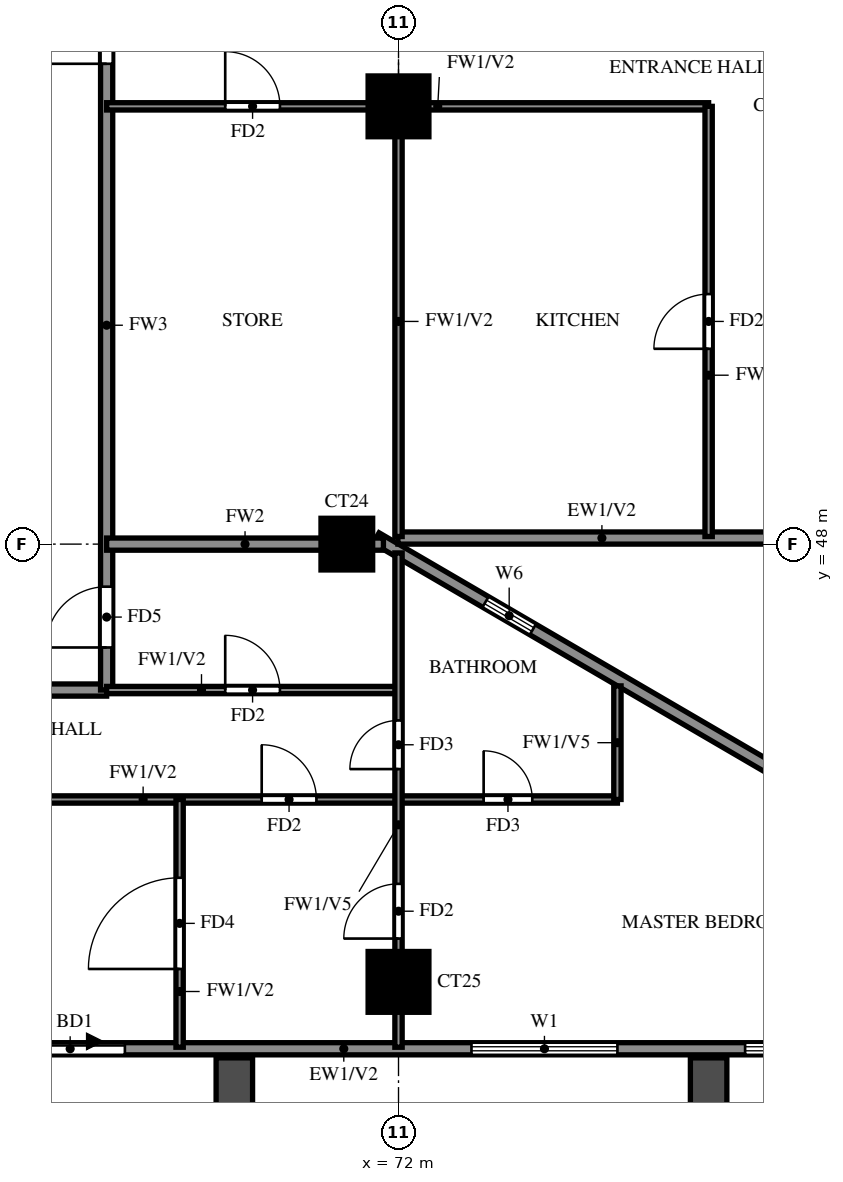
"""IFC4 building model, lengths in metres.
Left out: names, types, materials, properties, quantities, classifications, styles, units other than length and angle.
Written with IfcOpenShell. Run it as: python <this file> out.ifc"""

import sys

from ifc_helpers import new_model, si_unit, direction, frame, frame_2d, origin, origin_2d, place, context, subcontext, project, spatial, rectangle, extrude, source, transform, mapped, element, fill, save


model = new_model("IFC4")
c1 = context("Model", 3, precision=1e-05, world=origin(), true_north=direction((0.0, 1.0)))
c2 = subcontext(c1, "Body", "Model", "MODEL_VIEW")
j1 = project(units=[si_unit("LENGTHUNIT", "METRE"), si_unit("PLANEANGLEUNIT", "RADIAN")], contexts=[c1])
p1 = place(None, origin())
s1 = spatial("IfcSite", under=j1, at=p1, CompositionType="ELEMENT")
p2 = place(p1, origin())
s2 = spatial("IfcBuilding", under=s1, at=p2, CompositionType="ELEMENT")
p3 = place(p2, frame((0.0, 0.0, 157.0)))
s3 = spatial("IfcBuildingStorey", under=s2, at=p3, CompositionType="ELEMENT", Elevation=157.0)
m1 = source(origin(), c2, "Body", "SweptSolid", [
    extrude(rectangle(XDim=1.0, YDim=1.0, at=origin_2d()), origin(), (0.0, 0.0, 1.0), 3.2),
])
p4 = place(p3, frame((72.0, 40.8, 0.0), z_axis=(0.0, 0.0, 1.0), x_axis=(1.0, 0.0, 0.0)))
e1 = element("IfcColumn", 1, at=p4, inside=s3, PredefinedType="COLUMN", context=c2, shape_type="MappedRepresentation", body=[
    mapped(m1, transform((0.0, 0.0, 0.0))),
])
m2 = source(origin(), c2, "Body", "SweptSolid", [
    extrude(rectangle(XDim=0.85, YDim=0.85, at=origin_2d()), origin(), (0.0, 0.0, 1.0), 3.2),
])
p5 = place(p3, frame((71.15, 48.0, 0.0), z_axis=(0.0, 0.0, 1.0), x_axis=(1.0, 0.0, 0.0)))
e2 = element("IfcColumn", 2, at=p5, inside=s3, PredefinedType="COLUMN", context=c2, shape_type="MappedRepresentation", body=[
    mapped(m2, transform((0.0, 0.0, 0.0))),
])
p6 = place(p3, frame((72.0, 55.2, 0.0), z_axis=(0.0, 0.0, 1.0), x_axis=(1.0, 0.0, 0.0)))
e3 = element("IfcColumn", 3, at=p6, inside=s3, PredefinedType="COLUMN", context=c2, shape_type="MappedRepresentation", body=[
    mapped(m1, transform((0.0, 0.0, 0.0))),
])
p7 = place(p3, frame((85.719, 39.881, 0.0), z_axis=(0.0, 0.0, 1.0), x_axis=(-0.86377618652, 0.503875678716, 0.0)))
e4 = element("IfcWall", 4, at=p7, inside=s3, PredefinedType="SOLIDWALL", context=c2, shape_type="SweptSolid", body=[
    extrude(rectangle(XDim=16.311, YDim=0.2, at=frame_2d((8.156, 0.0))), origin(), (0.0, 0.0, 1.0), 3.2),
])
p8 = place(p7, frame((13.326, 0.0, 1.5)))
e5 = element("IfcOpeningElement", 5, at=p8, cuts=e4, PredefinedType="OPENING", context=c2, shape_type="SweptSolid", body=[
    extrude(rectangle(XDim=0.9, YDim=0.9, at=frame_2d((0.45, 0.45))), frame((0.0, 0.11, 0.0), z_axis=(0.0, -1.0, 0.0), x_axis=(1.0, 0.0, 0.0)), (0.0, 0.0, 1.0), 0.22),
])
p9 = place(p3, frame((71.99, 48.1, 0.0), z_axis=(0.0, 0.0, 1.0), x_axis=(1.0, 0.0, 0.0)))
e6 = element("IfcWall", 6, at=p9, inside=s3, PredefinedType="SOLIDWALL", context=c2, shape_type="SweptSolid", body=[
    extrude(rectangle(XDim=6.71, YDim=0.2, at=frame_2d((3.355, 0.0))), origin(), (0.0, 0.0, 1.0), 3.2),
])
p10 = place(p3, frame((58.8, 39.7, 0.0), z_axis=(0.0, 0.0, 1.0), x_axis=(1.0, 0.0, 0.0)))
e7 = element("IfcWall", 7, at=p10, inside=s3, PredefinedType="SOLIDWALL", context=c2, shape_type="SweptSolid", body=[
    extrude(rectangle(XDim=24.6, YDim=0.2, at=frame_2d((12.3, 0.0))), origin(), (0.0, 0.0, 1.0), 3.2),
])
p11 = place(p10, frame((6.9, 0.0, 0.0)))
e8 = element("IfcOpeningElement", 8, at=p11, cuts=e7, PredefinedType="OPENING", context=c2, shape_type="SweptSolid", body=[
    extrude(rectangle(XDim=1.8, YDim=2.4, at=frame_2d((0.9, 1.2))), frame((0.0, 0.11, 0.0), z_axis=(0.0, -1.0, 0.0), x_axis=(1.0, 0.0, 0.0)), (0.0, 0.0, 1.0), 0.22),
])
p12 = place(p10, frame((20.7, 0.0, 0.0)))
e9 = element("IfcOpeningElement", 9, at=p12, cuts=e7, PredefinedType="OPENING", context=c2, shape_type="SweptSolid", body=[
    extrude(rectangle(XDim=1.8, YDim=2.4, at=frame_2d((0.9, 1.2))), frame((0.0, 0.11, 0.0), z_axis=(0.0, -1.0, 0.0), x_axis=(1.0, 0.0, 0.0)), (0.0, 0.0, 1.0), 0.22),
])
p13 = place(p10, frame((1.5, 0.0, 0.6)))
e10 = element("IfcOpeningElement", 10, at=p13, cuts=e7, PredefinedType="OPENING", context=c2, shape_type="SweptSolid", body=[
    extrude(rectangle(XDim=1.8, YDim=2.4, at=frame_2d((0.9, 1.2))), frame((0.0, 0.11, 0.0), z_axis=(0.0, -1.0, 0.0), x_axis=(1.0, 0.0, 0.0)), (0.0, 0.0, 1.0), 0.22),
])
p14 = place(p10, frame((4.5, 0.0, 0.6)))
e11 = element("IfcOpeningElement", 11, at=p14, cuts=e7, PredefinedType="OPENING", context=c2, shape_type="SweptSolid", body=[
    extrude(rectangle(XDim=1.8, YDim=2.4, at=frame_2d((0.9, 1.2))), frame((0.0, 0.11, 0.0), z_axis=(0.0, -1.0, 0.0), x_axis=(1.0, 0.0, 0.0)), (0.0, 0.0, 1.0), 0.22),
])
p15 = place(p10, frame((14.4, 0.0, 0.6)))
e12 = element("IfcOpeningElement", 12, at=p15, cuts=e7, PredefinedType="OPENING", context=c2, shape_type="SweptSolid", body=[
    extrude(rectangle(XDim=2.4, YDim=2.4, at=frame_2d((1.2, 1.2))), frame((0.0, 0.11, 0.0), z_axis=(0.0, -1.0, 0.0), x_axis=(1.0, 0.0, 0.0)), (0.0, 0.0, 1.0), 0.22),
])
p16 = place(p10, frame((18.9, 0.0, 0.6)))
e13 = element("IfcOpeningElement", 13, at=p16, cuts=e7, PredefinedType="OPENING", context=c2, shape_type="SweptSolid", body=[
    extrude(rectangle(XDim=1.2, YDim=2.4, at=frame_2d((0.6, 1.2))), frame((0.0, 0.11, 0.0), z_axis=(0.0, -1.0, 0.0), x_axis=(1.0, 0.0, 0.0)), (0.0, 0.0, 1.0), 0.22),
])
p17 = place(p10, frame((23.0, 0.0, 0.6)))
e14 = element("IfcOpeningElement", 14, at=p17, cuts=e7, PredefinedType="OPENING", context=c2, shape_type="SweptSolid", body=[
    extrude(rectangle(XDim=1.2, YDim=2.4, at=frame_2d((0.6, 1.2))), frame((0.0, 0.11, 0.0), z_axis=(0.0, -1.0, 0.0), x_axis=(1.0, 0.0, 0.0)), (0.0, 0.0, 1.0), 0.22),
])
for number, where, z_axis, x_axis in (
    (15, (69.3, 39.55, 0.0), (0.0, 0.0, 1.0), (0.0, -1.0, 0.0)),
    (16, (77.1, 39.55, 0.0), (0.0, 0.0, 1.0), (0.0, -1.0, 0.0)),
):
    element("IfcWall", number, at=place(p3, frame(where, z_axis=z_axis, x_axis=x_axis)), inside=s3, PredefinedType="SOLIDWALL", context=c2, shape_type="SweptSolid", body=[
        extrude(rectangle(XDim=2.65, YDim=0.6, at=frame_2d((1.325, 0.0))), origin(), (0.0, 0.0, 1.0), 2.85),
    ])
p18 = place(p3, frame((60.0, 45.6, 0.0), z_axis=(0.0, 0.0, 1.0), x_axis=(1.0, 0.0, 0.0)))
e17 = element("IfcWall", 17, at=p18, inside=s3, PredefinedType="SOLIDWALL", context=c2, shape_type="SweptSolid", body=[
    extrude(rectangle(XDim=7.2, YDim=0.2, at=frame_2d((3.6, 0.0))), origin(), (0.0, 0.0, 1.0), 3.2),
])
p19 = place(p3, frame((67.2, 45.6, 0.0), z_axis=(0.0, 0.0, 1.0), x_axis=(0.0, 1.0, 0.0)))
e18 = element("IfcWall", 18, at=p19, inside=s3, PredefinedType="SOLIDWALL", context=c2, shape_type="SweptSolid", body=[
    extrude(rectangle(XDim=12.0, YDim=0.2, at=frame_2d((6.0, 0.0))), origin(), (0.0, 0.0, 1.0), 3.2),
])
p20 = place(p19, frame((10.3, 0.0, 0.0)))
e19 = element("IfcOpeningElement", 19, at=p20, cuts=e18, PredefinedType="OPENING", context=c2, shape_type="SweptSolid", body=[
    extrude(rectangle(XDim=1.0, YDim=2.1, at=frame_2d((0.5, 1.05))), frame((0.0, 0.11, 0.0), z_axis=(0.0, -1.0, 0.0), x_axis=(1.0, 0.0, 0.0)), (0.0, 0.0, 1.0), 0.22),
])
p21 = place(p19, frame((0.7, 0.0, 0.0)))
e20 = element("IfcOpeningElement", 20, at=p21, cuts=e18, PredefinedType="OPENING", context=c2, shape_type="SweptSolid", body=[
    extrude(rectangle(XDim=1.0, YDim=2.1, at=frame_2d((0.5, 1.05))), frame((0.0, 0.11, 0.0), z_axis=(0.0, -1.0, 0.0), x_axis=(1.0, 0.0, 0.0)), (0.0, 0.0, 1.0), 0.22),
])
p22 = place(p3, frame((67.2, 48.0, 0.0), z_axis=(0.0, 0.0, 1.0), x_axis=(1.0, 0.0, 0.0)))
e21 = element("IfcWall", 21, at=p22, inside=s3, PredefinedType="SOLIDWALL", context=c2, shape_type="SweptSolid", body=[
    extrude(rectangle(XDim=4.552, YDim=0.2, at=frame_2d((2.276, 0.0))), origin(), (0.0, 0.0, 1.0), 3.2),
])
p23 = place(p3, frame((60.0, 43.8, 0.0), z_axis=(0.0, 0.0, 1.0), x_axis=(1.0, 0.0, 0.0)))
e22 = element("IfcWall", 22, at=p23, inside=s3, PredefinedType="PARTITIONING", context=c2, shape_type="SweptSolid", body=[
    extrude(rectangle(XDim=15.6, YDim=0.12, at=frame_2d((7.8, 0.0))), origin(), (0.0, 0.0, 1.0), 3.2),
])
p24 = place(p23, frame((9.75, 0.0, 0.0)))
e23 = element("IfcOpeningElement", 23, at=p24, cuts=e22, PredefinedType="OPENING", context=c2, shape_type="SweptSolid", body=[
    extrude(rectangle(XDim=0.9, YDim=2.1, at=frame_2d((0.45, 1.05))), frame((0.0, 0.07, 0.0), z_axis=(0.0, -1.0, 0.0), x_axis=(1.0, 0.0, 0.0)), (0.0, 0.0, 1.0), 0.14),
])
p25 = place(p23, frame((3.45, 0.0, 0.0)))
e24 = element("IfcOpeningElement", 24, at=p25, cuts=e22, PredefinedType="OPENING", context=c2, shape_type="SweptSolid", body=[
    extrude(rectangle(XDim=1.5, YDim=2.1, at=frame_2d((0.75, 1.05))), frame((0.0, 0.07, 0.0), z_axis=(0.0, -1.0, 0.0), x_axis=(1.0, 0.0, 0.0)), (0.0, 0.0, 1.0), 0.14),
])
p26 = place(p23, frame((13.4, 0.0, 0.0)))
e25 = element("IfcOpeningElement", 25, at=p26, cuts=e22, PredefinedType="OPENING", context=c2, shape_type="SweptSolid", body=[
    extrude(rectangle(XDim=0.8, YDim=2.1, at=frame_2d((0.4, 1.05))), frame((0.0, 0.07, 0.0), z_axis=(0.0, -1.0, 0.0), x_axis=(1.0, 0.0, 0.0)), (0.0, 0.0, 1.0), 0.14),
])
p27 = place(p3, frame((67.2, 45.6, 0.0), z_axis=(0.0, 0.0, 1.0), x_axis=(1.0, 0.0, 0.0)))
e26 = element("IfcWall", 26, at=p27, inside=s3, PredefinedType="PARTITIONING", context=c2, shape_type="SweptSolid", body=[
    extrude(rectangle(XDim=4.8, YDim=0.12, at=frame_2d((2.4, 0.0))), origin(), (0.0, 0.0, 1.0), 3.2),
])
p28 = place(p27, frame((1.95, 0.0, 0.0)))
e27 = element("IfcOpeningElement", 27, at=p28, cuts=e26, PredefinedType="OPENING", context=c2, shape_type="SweptSolid", body=[
    extrude(rectangle(XDim=0.9, YDim=2.1, at=frame_2d((0.45, 1.05))), frame((0.0, 0.07, 0.0), z_axis=(0.0, -1.0, 0.0), x_axis=(1.0, 0.0, 0.0)), (0.0, 0.0, 1.0), 0.14),
])
p29 = place(p3, frame((67.2, 55.2, 0.0), z_axis=(0.0, 0.0, 1.0), x_axis=(1.0, 0.0, 0.0)))
e28 = element("IfcWall", 28, at=p29, inside=s3, PredefinedType="PARTITIONING", context=c2, shape_type="SweptSolid", body=[
    extrude(rectangle(XDim=9.9, YDim=0.12, at=frame_2d((4.95, 0.0))), origin(), (0.0, 0.0, 1.0), 3.2),
])
p30 = place(p29, frame((1.95, 0.0, 0.0)))
e29 = element("IfcOpeningElement", 29, at=p30, cuts=e28, PredefinedType="OPENING", context=c2, shape_type="SweptSolid", body=[
    extrude(rectangle(XDim=0.9, YDim=2.1, at=frame_2d((0.45, 1.05))), frame((0.0, 0.07, 0.0), z_axis=(0.0, -1.0, 0.0), x_axis=(1.0, 0.0, 0.0)), (0.0, 0.0, 1.0), 0.14),
])
p31 = place(p3, frame((68.4, 39.725, 0.0), z_axis=(0.0, 0.0, 1.0), x_axis=(0.0, 1.0, 0.0)))
e30 = element("IfcWall", 30, at=p31, inside=s3, PredefinedType="PARTITIONING", context=c2, shape_type="SweptSolid", body=[
    extrude(rectangle(XDim=4.075, YDim=0.12, at=frame_2d((2.038, 0.0))), origin(), (0.0, 0.0, 1.0), 3.2),
])
p32 = place(p31, frame((1.288, 0.0, 0.0)))
e31 = element("IfcOpeningElement", 31, at=p32, cuts=e30, PredefinedType="OPENING", context=c2, shape_type="SweptSolid", body=[
    extrude(rectangle(XDim=1.5, YDim=2.1, at=frame_2d((0.75, 1.05))), frame((0.0, 0.07, 0.0), z_axis=(0.0, -1.0, 0.0), x_axis=(1.0, 0.0, 0.0)), (0.0, 0.0, 1.0), 0.14),
])
p33 = place(p3, frame((72.0, 39.725, 0.0), z_axis=(0.0, 0.0, 1.0), x_axis=(0.0, 1.0, 0.0)))
e32 = element("IfcWall", 32, at=p33, inside=s3, PredefinedType="PARTITIONING", context=c2, shape_type="SweptSolid", body=[
    extrude(rectangle(XDim=8.13, YDim=0.12, at=frame_2d((4.065, 0.0))), origin(), (0.0, 0.0, 1.0), 2.3),
])
p34 = place(p33, frame((1.788, 0.0, 0.0)))
e33 = element("IfcOpeningElement", 33, at=p34, cuts=e32, PredefinedType="OPENING", context=c2, shape_type="SweptSolid", body=[
    extrude(rectangle(XDim=0.9, YDim=2.1, at=frame_2d((0.45, 1.05))), frame((0.0, 0.07, 0.0), z_axis=(0.0, -1.0, 0.0), x_axis=(1.0, 0.0, 0.0)), (0.0, 0.0, 1.0), 0.14),
])
p35 = place(p33, frame((4.575, 0.0, 0.0)))
e34 = element("IfcOpeningElement", 34, at=p35, cuts=e32, PredefinedType="OPENING", context=c2, shape_type="SweptSolid", body=[
    extrude(rectangle(XDim=0.8, YDim=2.1, at=frame_2d((0.4, 1.05))), frame((0.0, 0.07, 0.0), z_axis=(0.0, -1.0, 0.0), x_axis=(1.0, 0.0, 0.0)), (0.0, 0.0, 1.0), 0.14),
])
p36 = place(p3, frame((72.0, 48.125, 0.0), z_axis=(0.0, 0.0, 1.0), x_axis=(0.0, 1.0, 0.0)))
e35 = element("IfcWall", 35, at=p36, inside=s3, PredefinedType="PARTITIONING", context=c2, shape_type="SweptSolid", body=[
    extrude(rectangle(XDim=7.075, YDim=0.12, at=frame_2d((3.538, 0.0))), origin(), (0.0, 0.0, 1.0), 3.2),
])
p37 = place(p3, frame((75.6, 43.8, 0.0), z_axis=(0.0, 0.0, 1.0), x_axis=(0.0, 1.0, 0.0)))
e36 = element("IfcWall", 36, at=p37, inside=s3, PredefinedType="PARTITIONING", context=c2, shape_type="SweptSolid", body=[
    extrude(rectangle(XDim=1.868, YDim=0.12, at=frame_2d((0.934, 0.0))), origin(), (0.0, 0.0, 1.0), 2.3),
])
p38 = place(p3, frame((77.1, 48.125, 0.0), z_axis=(0.0, 0.0, 1.0), x_axis=(0.0, 1.0, 0.0)))
e37 = element("IfcWall", 37, at=p38, inside=s3, PredefinedType="PARTITIONING", context=c2, shape_type="SweptSolid", body=[
    extrude(rectangle(XDim=7.075, YDim=0.12, at=frame_2d((3.538, 0.0))), origin(), (0.0, 0.0, 1.0), 3.2),
])
p39 = place(p38, frame((3.087, 0.0, 0.0)))
e38 = element("IfcOpeningElement", 38, at=p39, cuts=e37, PredefinedType="OPENING", context=c2, shape_type="SweptSolid", body=[
    extrude(rectangle(XDim=0.9, YDim=2.1, at=frame_2d((0.45, 1.05))), frame((0.0, 0.07, 0.0), z_axis=(0.0, -1.0, 0.0), x_axis=(1.0, 0.0, 0.0)), (0.0, 0.0, 1.0), 0.14),
])
p40 = place(p8, origin())
e39 = element("IfcWindow", 39, at=p40, inside=s3, PartitioningType="SINGLE_PANEL", PredefinedType="WINDOW", context=c2, shape_type="SweptSolid", body=[
    extrude(rectangle(XDim=0.9, YDim=0.9, at=frame_2d((0.45, 0.45))), frame((0.0, 0.03, 0.0), z_axis=(0.0, -1.0, 0.0), x_axis=(1.0, 0.0, 0.0)), (0.0, 0.0, 1.0), 0.06),
])
fill(e5, e39)
p41 = place(p11, origin())
e40 = element("IfcDoor", 40, at=p41, inside=s3, OperationType="DOUBLE_DOOR_SLIDING", PredefinedType="DOOR", context=c2, shape_type="SweptSolid", body=[
    extrude(rectangle(XDim=1.8, YDim=2.4, at=frame_2d((0.9, 1.2))), frame((0.0, 0.025, 0.0), z_axis=(0.0, -1.0, 0.0), x_axis=(1.0, 0.0, 0.0)), (0.0, 0.0, 1.0), 0.05),
])
fill(e8, e40)
p42 = place(p15, origin())
e41 = element("IfcWindow", 41, at=p42, inside=s3, PartitioningType="DOUBLE_PANEL_VERTICAL", PredefinedType="WINDOW", context=c2, shape_type="SweptSolid", body=[
    extrude(rectangle(XDim=2.4, YDim=2.4, at=frame_2d((1.2, 1.2))), frame((0.0, 0.03, 0.0), z_axis=(0.0, -1.0, 0.0), x_axis=(1.0, 0.0, 0.0)), (0.0, 0.0, 1.0), 0.06),
])
fill(e12, e41)
p43 = place(p16, origin())
e42 = element("IfcWindow", 42, at=p43, inside=s3, PartitioningType="SINGLE_PANEL", PredefinedType="WINDOW", context=c2, shape_type="SweptSolid", body=[
    extrude(rectangle(XDim=1.2, YDim=2.4, at=frame_2d((0.6, 1.2))), frame((0.0, 0.03, 0.0), z_axis=(0.0, -1.0, 0.0), x_axis=(1.0, 0.0, 0.0)), (0.0, 0.0, 1.0), 0.06),
])
fill(e13, e42)
p44 = place(p20, origin())
e43 = element("IfcDoor", 43, at=p44, inside=s3, OperationType="SINGLE_SWING_RIGHT", PredefinedType="DOOR", context=c2, shape_type="SweptSolid", body=[
    extrude(rectangle(XDim=1.0, YDim=2.1, at=frame_2d((0.5, 1.05))), frame((0.0, 0.025, 0.0), z_axis=(0.0, -1.0, 0.0), x_axis=(1.0, 0.0, 0.0)), (0.0, 0.0, 1.0), 0.05),
])
fill(e19, e43)
p45 = place(p39, origin())
e44 = element("IfcDoor", 44, at=p45, inside=s3, OperationType="SINGLE_SWING_LEFT", PredefinedType="DOOR", context=c2, shape_type="SweptSolid", body=[
    extrude(rectangle(XDim=0.9, YDim=2.1, at=frame_2d((0.45, 1.05))), frame((0.0, 0.025, 0.0), z_axis=(0.0, -1.0, 0.0), x_axis=(1.0, 0.0, 0.0)), (0.0, 0.0, 1.0), 0.05),
])
fill(e38, e44)
p46 = place(p30, origin())
e45 = element("IfcDoor", 45, at=p46, inside=s3, OperationType="SINGLE_SWING_RIGHT", PredefinedType="DOOR", context=c2, shape_type="SweptSolid", body=[
    extrude(rectangle(XDim=0.9, YDim=2.1, at=frame_2d((0.45, 1.05))), frame((0.0, 0.025, 0.0), z_axis=(0.0, -1.0, 0.0), x_axis=(1.0, 0.0, 0.0)), (0.0, 0.0, 1.0), 0.05),
])
fill(e29, e45)
p47 = place(p32, origin())
e46 = element("IfcDoor", 46, at=p47, inside=s3, OperationType="SINGLE_SWING_LEFT", PredefinedType="DOOR", context=c2, shape_type="SweptSolid", body=[
    extrude(rectangle(XDim=1.5, YDim=2.1, at=frame_2d((0.75, 1.05))), frame((0.0, 0.025, 0.0), z_axis=(0.0, -1.0, 0.0), x_axis=(1.0, 0.0, 0.0)), (0.0, 0.0, 1.0), 0.05),
])
fill(e31, e46)
p48 = place(p28, origin())
e47 = element("IfcDoor", 47, at=p48, inside=s3, OperationType="SINGLE_SWING_LEFT", PredefinedType="DOOR", context=c2, shape_type="SweptSolid", body=[
    extrude(rectangle(XDim=0.9, YDim=2.1, at=frame_2d((0.45, 1.05))), frame((0.0, 0.025, 0.0), z_axis=(0.0, -1.0, 0.0), x_axis=(1.0, 0.0, 0.0)), (0.0, 0.0, 1.0), 0.05),
])
fill(e27, e47)
p49 = place(p21, origin())
e48 = element("IfcDoor", 48, at=p49, inside=s3, OperationType="SINGLE_SWING_RIGHT", PredefinedType="DOOR", context=c2, shape_type="SweptSolid", body=[
    extrude(rectangle(XDim=1.0, YDim=2.1, at=frame_2d((0.5, 1.05))), frame((0.0, 0.025, 0.0), z_axis=(0.0, -1.0, 0.0), x_axis=(1.0, 0.0, 0.0)), (0.0, 0.0, 1.0), 0.05),
])
fill(e20, e48)
p50 = place(p24, origin())
e49 = element("IfcDoor", 49, at=p50, inside=s3, OperationType="SINGLE_SWING_LEFT", PredefinedType="DOOR", context=c2, shape_type="SweptSolid", body=[
    extrude(rectangle(XDim=0.9, YDim=2.1, at=frame_2d((0.45, 1.05))), frame((0.0, 0.025, 0.0), z_axis=(0.0, -1.0, 0.0), x_axis=(1.0, 0.0, 0.0)), (0.0, 0.0, 1.0), 0.05),
])
fill(e23, e49)
p51 = place(p34, origin())
e50 = element("IfcDoor", 50, at=p51, inside=s3, OperationType="SINGLE_SWING_LEFT", PredefinedType="DOOR", context=c2, shape_type="SweptSolid", body=[
    extrude(rectangle(XDim=0.9, YDim=2.1, at=frame_2d((0.45, 1.05))), frame((0.0, 0.025, 0.0), z_axis=(0.0, -1.0, 0.0), x_axis=(1.0, 0.0, 0.0)), (0.0, 0.0, 1.0), 0.05),
])
fill(e33, e50)
p52 = place(p35, origin())
e51 = element("IfcDoor", 51, at=p52, inside=s3, OperationType="SINGLE_SWING_LEFT", PredefinedType="DOOR", context=c2, shape_type="SweptSolid", body=[
    extrude(rectangle(XDim=0.8, YDim=2.1, at=frame_2d((0.4, 1.05))), frame((0.0, 0.025, 0.0), z_axis=(0.0, -1.0, 0.0), x_axis=(1.0, 0.0, 0.0)), (0.0, 0.0, 1.0), 0.05),
])
fill(e34, e51)
p53 = place(p26, origin())
e52 = element("IfcDoor", 52, at=p53, inside=s3, OperationType="SINGLE_SWING_LEFT", PredefinedType="DOOR", context=c2, shape_type="SweptSolid", body=[
    extrude(rectangle(XDim=0.8, YDim=2.1, at=frame_2d((0.4, 1.05))), frame((0.0, 0.025, 0.0), z_axis=(0.0, -1.0, 0.0), x_axis=(1.0, 0.0, 0.0)), (0.0, 0.0, 1.0), 0.05),
])
fill(e25, e52)
save(model, sys.argv[1])
